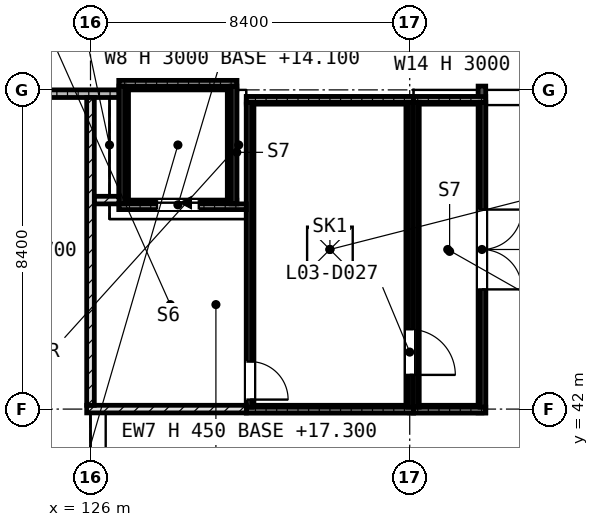
"""IFC4 building model, lengths in metres.
Left out: names, types, materials, properties, quantities, classifications, styles, units other than length and angle.
Written with IfcOpenShell. Run it as: python <this file> out.ifc"""

import sys

from ifc_helpers import new_model, si_unit, direction, frame, frame_2d, origin, origin_2d, place, context, subcontext, project, spatial, rectangle, extrude, element, fill, save


model = new_model("IFC4")
c1 = context("Model", 3, precision=1e-05, world=origin(), true_north=direction((0.0, 1.0)))
c2 = subcontext(c1, "Body", "Model", "MODEL_VIEW")
j1 = project(units=[si_unit("LENGTHUNIT", "METRE"), si_unit("PLANEANGLEUNIT", "RADIAN")], contexts=[c1])
p1 = place(None, origin())
s1 = spatial("IfcSite", under=j1, at=p1, CompositionType="ELEMENT")
p2 = place(p1, origin())
s2 = spatial("IfcBuilding", under=s1, at=p2, CompositionType="ELEMENT")
p3 = place(p2, frame((0.0, 0.0, 14.4)))
s3 = spatial("IfcBuildingStorey", under=s2, at=p3, CompositionType="ELEMENT", Elevation=14.4)
p4 = place(p3, frame((126.75, 47.375, -0.3), z_axis=(0.0, 0.0, 1.0), x_axis=(1.0, 0.0, 0.0)))
e1 = element("IfcWall", 1, at=p4, inside=s3, PredefinedType="SHEAR", context=c2, shape_type="SweptSolid", body=[
    extrude(rectangle(XDim=3.1, YDim=0.25, at=frame_2d((1.55, 0.0))), origin(), (0.0, 0.0, 1.0), 3.0),
])
p5 = place(p4, frame((1.0, 0.0, 0.3)))
e2 = element("IfcOpeningElement", 2, at=p5, cuts=e1, PredefinedType="OPENING", context=c2, shape_type="SweptSolid", body=[
    extrude(rectangle(XDim=1.1, YDim=2.1, at=frame_2d((0.55, 1.05))), frame((0.0, 0.135, 0.0), z_axis=(0.0, -1.0, 0.0), x_axis=(1.0, 0.0, 0.0)), (0.0, 0.0, 1.0), 0.27),
])
p6 = place(p3, frame((126.75, 50.525, -0.3), z_axis=(0.0, 0.0, 1.0), x_axis=(1.0, 0.0, 0.0)))
e3 = element("IfcWall", 3, at=p6, inside=s3, PredefinedType="SHEAR", context=c2, shape_type="SweptSolid", body=[
    extrude(rectangle(XDim=3.1, YDim=0.25, at=frame_2d((1.55, 0.0))), origin(), (0.0, 0.0, 1.0), 3.0),
])
for number, where, z_axis, x_axis in (
    (4, (126.875, 47.5, -0.3), (0.0, 0.0, 1.0), (0.0, 1.0, 0.0)),
    (5, (129.725, 47.5, -0.3), (0.0, 0.0, 1.0), (0.0, 1.0, 0.0)),
):
    element("IfcWall", number, at=place(p3, frame(where, z_axis=z_axis, x_axis=x_axis)), inside=s3, PredefinedType="SHEAR", context=c2, shape_type="SweptSolid", body=[
        extrude(rectangle(XDim=2.9, YDim=0.25, at=frame_2d((1.45, 0.0))), origin(), (0.0, 0.0, 1.0), 3.0),
    ])
for number, where, z_axis, x_axis in (
    (6, (130.1, 42.0, -0.3), (0.0, 0.0, 1.0), (1.0, 0.0, 0.0)),
    (7, (130.1, 50.125, -0.3), (0.0, 0.0, 1.0), (1.0, 0.0, 0.0)),
):
    element("IfcWall", number, at=place(p3, frame(where, z_axis=z_axis, x_axis=x_axis)), inside=s3, PredefinedType="SHEAR", context=c2, shape_type="SweptSolid", body=[
        extrude(rectangle(XDim=4.4, YDim=0.2, at=frame_2d((2.2, 0.0))), origin(), (0.0, 0.0, 1.0), 3.0),
    ])
p7 = place(p3, frame((130.2, 42.1, -0.3), z_axis=(0.0, 0.0, 1.0), x_axis=(0.0, 1.0, 0.0)))
e8 = element("IfcWall", 8, at=p7, inside=s3, PredefinedType="SHEAR", context=c2, shape_type="SweptSolid", body=[
    extrude(rectangle(XDim=7.925, YDim=0.2, at=frame_2d((3.962, 0.0))), origin(), (0.0, 0.0, 1.0), 3.0),
])
p8 = place(p7, frame((0.15, 0.0, 0.3)))
e9 = element("IfcOpeningElement", 9, at=p8, cuts=e8, PredefinedType="OPENING", context=c2, shape_type="SweptSolid", body=[
    extrude(rectangle(XDim=1.0, YDim=2.1, at=frame_2d((0.5, 1.05))), frame((0.0, 0.11, 0.0), z_axis=(0.0, -1.0, 0.0), x_axis=(1.0, 0.0, 0.0)), (0.0, 0.0, 1.0), 0.22),
])
p9 = place(p3, frame((134.4, 42.1, -0.3), z_axis=(0.0, 0.0, 1.0), x_axis=(0.0, 1.0, 0.0)))
e10 = element("IfcWall", 10, at=p9, inside=s3, PredefinedType="SHEAR", context=c2, shape_type="SweptSolid", body=[
    extrude(rectangle(XDim=7.925, YDim=0.2, at=frame_2d((3.962, 0.0))), origin(), (0.0, 0.0, 1.0), 3.0),
])
p10 = place(p9, frame((0.8, 0.0, 0.3)))
e11 = element("IfcOpeningElement", 11, at=p10, cuts=e10, PredefinedType="OPENING", context=c2, shape_type="SweptSolid", body=[
    extrude(rectangle(XDim=1.2, YDim=2.2, at=frame_2d((0.6, 1.1))), frame((0.0, 0.11, 0.0), z_axis=(0.0, -1.0, 0.0), x_axis=(1.0, 0.0, 0.0)), (0.0, 0.0, 1.0), 0.22),
])
for number, where, z_axis, x_axis in (
    (12, (134.4, 42.0, -0.3), (0.0, 0.0, 1.0), (1.0, 0.0, 0.0)),
    (13, (134.4, 50.125, -0.3), (0.0, 0.0, 1.0), (1.0, 0.0, 0.0)),
):
    element("IfcWall", number, at=place(p3, frame(where, z_axis=z_axis, x_axis=x_axis)), inside=s3, PredefinedType="SHEAR", context=c2, shape_type="SweptSolid", body=[
        extrude(rectangle(XDim=1.9, YDim=0.2, at=frame_2d((0.95, 0.0))), origin(), (0.0, 0.0, 1.0), 3.0),
    ])
p11 = place(p3, frame((136.3, 41.9, -0.3), z_axis=(0.0, 0.0, 1.0), x_axis=(0.0, 1.0, 0.0)))
e14 = element("IfcWall", 14, at=p11, inside=s3, PredefinedType="SHEAR", context=c2, shape_type="SweptSolid", body=[
    extrude(rectangle(XDim=8.6, YDim=0.2, at=frame_2d((4.3, 0.0))), origin(), (0.0, 0.0, 1.0), 3.0),
])
p12 = place(p11, frame((5.35, 0.0, 0.3), z_axis=(0.0, 0.0, 1.0), x_axis=(-1.0, 0.0, 0.0)))
e15 = element("IfcOpeningElement", 15, at=p12, cuts=e14, PredefinedType="OPENING", context=c2, shape_type="SweptSolid", body=[
    extrude(rectangle(XDim=2.1, YDim=2.2, at=frame_2d((1.05, 1.1))), frame((0.0, 0.11, 0.0), z_axis=(0.0, -1.0, 0.0), x_axis=(1.0, 0.0, 0.0)), (0.0, 0.0, 1.0), 0.22),
])
p13 = place(p3, frame((121.8, 50.3, 0.0), z_axis=(0.0, 0.0, 1.0), x_axis=(1.0, 0.0, 0.0)))
e16 = element("IfcWall", 16, at=p13, inside=s3, PredefinedType="PARAPET", context=c2, shape_type="SweptSolid", body=[
    extrude(rectangle(XDim=4.95, YDim=0.2, at=frame_2d((2.475, 0.0))), origin(), (0.0, 0.0, 1.0), 1.5),
])
for number, where, z_axis, x_axis in (
    (17, (130.1, 41.975, 2.9), (0.0, 0.0, 1.0), (1.0, 0.0, 0.0)),
    (18, (130.1, 50.15, 2.9), (0.0, 0.0, 1.0), (1.0, 0.0, 0.0)),
):
    element("IfcWall", number, at=place(p3, frame(where, z_axis=z_axis, x_axis=x_axis)), inside=s3, PredefinedType="PARAPET", context=c2, shape_type="SweptSolid", body=[
        extrude(rectangle(XDim=4.4, YDim=0.15, at=frame_2d((2.2, 0.0))), origin(), (0.0, 0.0, 1.0), 0.45),
    ])
for number, where, z_axis, x_axis in (
    (19, (130.175, 42.05, 2.9), (0.0, 0.0, 1.0), (0.0, 1.0, 0.0)),
    (20, (134.425, 42.05, 2.9), (0.0, 0.0, 1.0), (0.0, 1.0, 0.0)),
):
    element("IfcWall", number, at=place(p3, frame(where, z_axis=z_axis, x_axis=x_axis)), inside=s3, PredefinedType="PARAPET", context=c2, shape_type="SweptSolid", body=[
        extrude(rectangle(XDim=8.025, YDim=0.15, at=frame_2d((4.012, 0.0))), origin(), (0.0, 0.0, 1.0), 0.45),
    ])
for number, where, z_axis, x_axis in (
    (21, (134.5, 41.975, 2.9), (0.0, 0.0, 1.0), (1.0, 0.0, 0.0)),
    (22, (134.5, 50.15, 2.9), (0.0, 0.0, 1.0), (1.0, 0.0, 0.0)),
):
    element("IfcWall", number, at=place(p3, frame(where, z_axis=z_axis, x_axis=x_axis)), inside=s3, PredefinedType="PARAPET", context=c2, shape_type="SweptSolid", body=[
        extrude(rectangle(XDim=1.9, YDim=0.15, at=frame_2d((0.95, 0.0))), origin(), (0.0, 0.0, 1.0), 0.45),
    ])
for number, where, z_axis, x_axis in (
    (23, (134.575, 42.05, 2.9), (0.0, 0.0, 1.0), (0.0, 1.0, 0.0)),
    (24, (136.325, 42.05, 2.9), (0.0, 0.0, 1.0), (0.0, 1.0, 0.0)),
):
    element("IfcWall", number, at=place(p3, frame(where, z_axis=z_axis, x_axis=x_axis)), inside=s3, PredefinedType="PARAPET", context=c2, shape_type="SweptSolid", body=[
        extrude(rectangle(XDim=8.025, YDim=0.15, at=frame_2d((4.012, 0.0))), origin(), (0.0, 0.0, 1.0), 0.45),
    ])
p14 = place(p3, frame((126.75, 47.325, 2.9), z_axis=(0.0, 0.0, 1.0), x_axis=(1.0, 0.0, 0.0)))
e25 = element("IfcWall", 25, at=p14, inside=s3, PredefinedType="PARAPET", context=c2, shape_type="SweptSolid", body=[
    extrude(rectangle(XDim=3.35, YDim=0.15, at=frame_2d((1.675, 0.0))), origin(), (0.0, 0.0, 1.0), 0.45),
])
for number, where, z_axis, x_axis in (
    (26, (126.75, 50.575, 2.9), (0.0, 0.0, 1.0), (1.0, 0.0, 0.0)),
    (27, (126.825, 47.4, 2.9), (0.0, 0.0, 1.0), (0.0, 1.0, 0.0)),
    (28, (129.775, 47.4, 2.9), (0.0, 0.0, 1.0), (0.0, 1.0, 0.0)),
):
    element("IfcWall", number, at=place(p3, frame(where, z_axis=z_axis, x_axis=x_axis)), inside=s3, PredefinedType="PARAPET", context=c2, shape_type="SweptSolid", body=[
        extrude(rectangle(XDim=3.1, YDim=0.15, at=frame_2d((1.55, 0.0))), origin(), (0.0, 0.0, 1.0), 0.45),
    ])
p15 = place(p3, frame((125.9, 42.0, 0.0), z_axis=(0.0, 0.0, 1.0), x_axis=(1.0, 0.0, 0.0)))
e29 = element("IfcWall", 29, at=p15, inside=s3, PredefinedType="SOLIDWALL", context=c2, shape_type="SweptSolid", body=[
    extrude(rectangle(XDim=4.2, YDim=0.2, at=frame_2d((2.1, 0.0))), origin(), (0.0, 0.0, 1.0), 2.7),
])
p16 = place(p3, frame((126.1, 47.5, 0.0), z_axis=(0.0, 0.0, 1.0), x_axis=(1.0, 0.0, 0.0)))
e30 = element("IfcWall", 30, at=p16, inside=s3, PredefinedType="SOLIDWALL", context=c2, shape_type="SweptSolid", body=[
    extrude(rectangle(XDim=0.65, YDim=0.2, at=frame_2d((0.325, 0.0))), origin(), (0.0, 0.0, 1.0), 2.7),
])
p17 = place(p3, frame((126.0, 42.1, 0.0), z_axis=(0.0, 0.0, 1.0), x_axis=(0.0, 1.0, 0.0)))
e31 = element("IfcWall", 31, at=p17, inside=s3, PredefinedType="SOLIDWALL", context=c2, shape_type="SweptSolid", body=[
    extrude(rectangle(XDim=8.1, YDim=0.2, at=frame_2d((4.05, 0.0))), origin(), (0.0, 0.0, 1.0), 2.7),
])
p18 = place(p12, origin())
e32 = element("IfcDoor", 32, at=p18, inside=s3, OperationType="DOUBLE_DOOR_SINGLE_SWING", PredefinedType="DOOR", context=c2, shape_type="SweptSolid", body=[
    extrude(rectangle(XDim=2.1, YDim=0.013, at=frame_2d((1.05, 0.007))), frame((0.0, 0.088, 0.0), z_axis=(0.0, -1.0, 0.0), x_axis=(1.0, 0.0, 0.0)), (0.0, 0.0, 1.0), 0.176),
    extrude(rectangle(XDim=0.075, YDim=2.112, at=frame_2d((0.038, 1.069))), frame((0.0, 0.098, 0.0), z_axis=(0.0, -1.0, 0.0), x_axis=(1.0, 0.0, 0.0)), (0.0, 0.0, 1.0), 0.196),
    extrude(rectangle(XDim=0.075, YDim=2.112, at=frame_2d((2.062, 1.069))), frame((0.0, 0.098, 0.0), z_axis=(0.0, -1.0, 0.0), x_axis=(1.0, 0.0, 0.0)), (0.0, 0.0, 1.0), 0.196),
    extrude(rectangle(XDim=2.1, YDim=0.075, at=frame_2d((1.05, 2.163))), frame((0.0, 0.088, 0.0), z_axis=(0.0, -1.0, 0.0), x_axis=(1.0, 0.0, 0.0)), (0.0, 0.0, 1.0), 0.176),
    extrude(rectangle(XDim=1.95, YDim=2.112, at=frame_2d((1.05, 1.069))), frame((0.0, 0.025, 0.0), z_axis=(0.0, -1.0, 0.0), x_axis=(1.0, 0.0, 0.0)), (0.0, 0.0, 1.0), 0.05),
])
fill(e15, e32)
p19 = place(p10, origin())
e33 = element("IfcDoor", 33, at=p19, inside=s3, OperationType="SINGLE_SWING_LEFT", PredefinedType="DOOR", context=c2, shape_type="SweptSolid", body=[
    extrude(rectangle(XDim=1.2, YDim=2.2, at=frame_2d((0.6, 1.1))), frame((0.0, 0.025, 0.0), z_axis=(0.0, -1.0, 0.0), x_axis=(1.0, 0.0, 0.0)), (0.0, 0.0, 1.0), 0.05),
])
fill(e11, e33)
p20 = place(p3, frame((0.0, 0.0, 2.7)))
p21 = place(p20, frame((132.3, 46.2, 0.0)))
p22 = place(p21, frame((0.0, 0.0, 0.15)))
e34 = element("IfcWindow", 34, at=p22, inside=s3, PartitioningType="SINGLE_PANEL", PredefinedType="SKYLIGHT", context=c2, shape_type="SweptSolid", body=[
    extrude(rectangle(XDim=1.2, YDim=1.2, at=origin_2d()), origin(), (0.0, 0.0, 1.0), 0.05),
])
p23 = place(p5, origin())
e35 = element("IfcDoor", 35, at=p23, inside=s3, OperationType="SLIDING_TO_LEFT", PredefinedType="DOOR", context=c2, shape_type="SweptSolid", body=[
    extrude(rectangle(XDim=1.1, YDim=2.1, at=frame_2d((0.55, 1.05))), frame((0.0, 0.025, 0.0), z_axis=(0.0, -1.0, 0.0), x_axis=(1.0, 0.0, 0.0)), (0.0, 0.0, 1.0), 0.05),
])
fill(e2, e35)
p24 = place(p8, origin())
e36 = element("IfcDoor", 36, at=p24, inside=s3, OperationType="SINGLE_SWING_LEFT", PredefinedType="DOOR", context=c2, shape_type="SweptSolid", body=[
    extrude(rectangle(XDim=1.0, YDim=2.1, at=frame_2d((0.5, 1.05))), frame((0.0, 0.025, 0.0), z_axis=(0.0, -1.0, 0.0), x_axis=(1.0, 0.0, 0.0)), (0.0, 0.0, 1.0), 0.05),
])
fill(e9, e36)
save(model, sys.argv[1])
